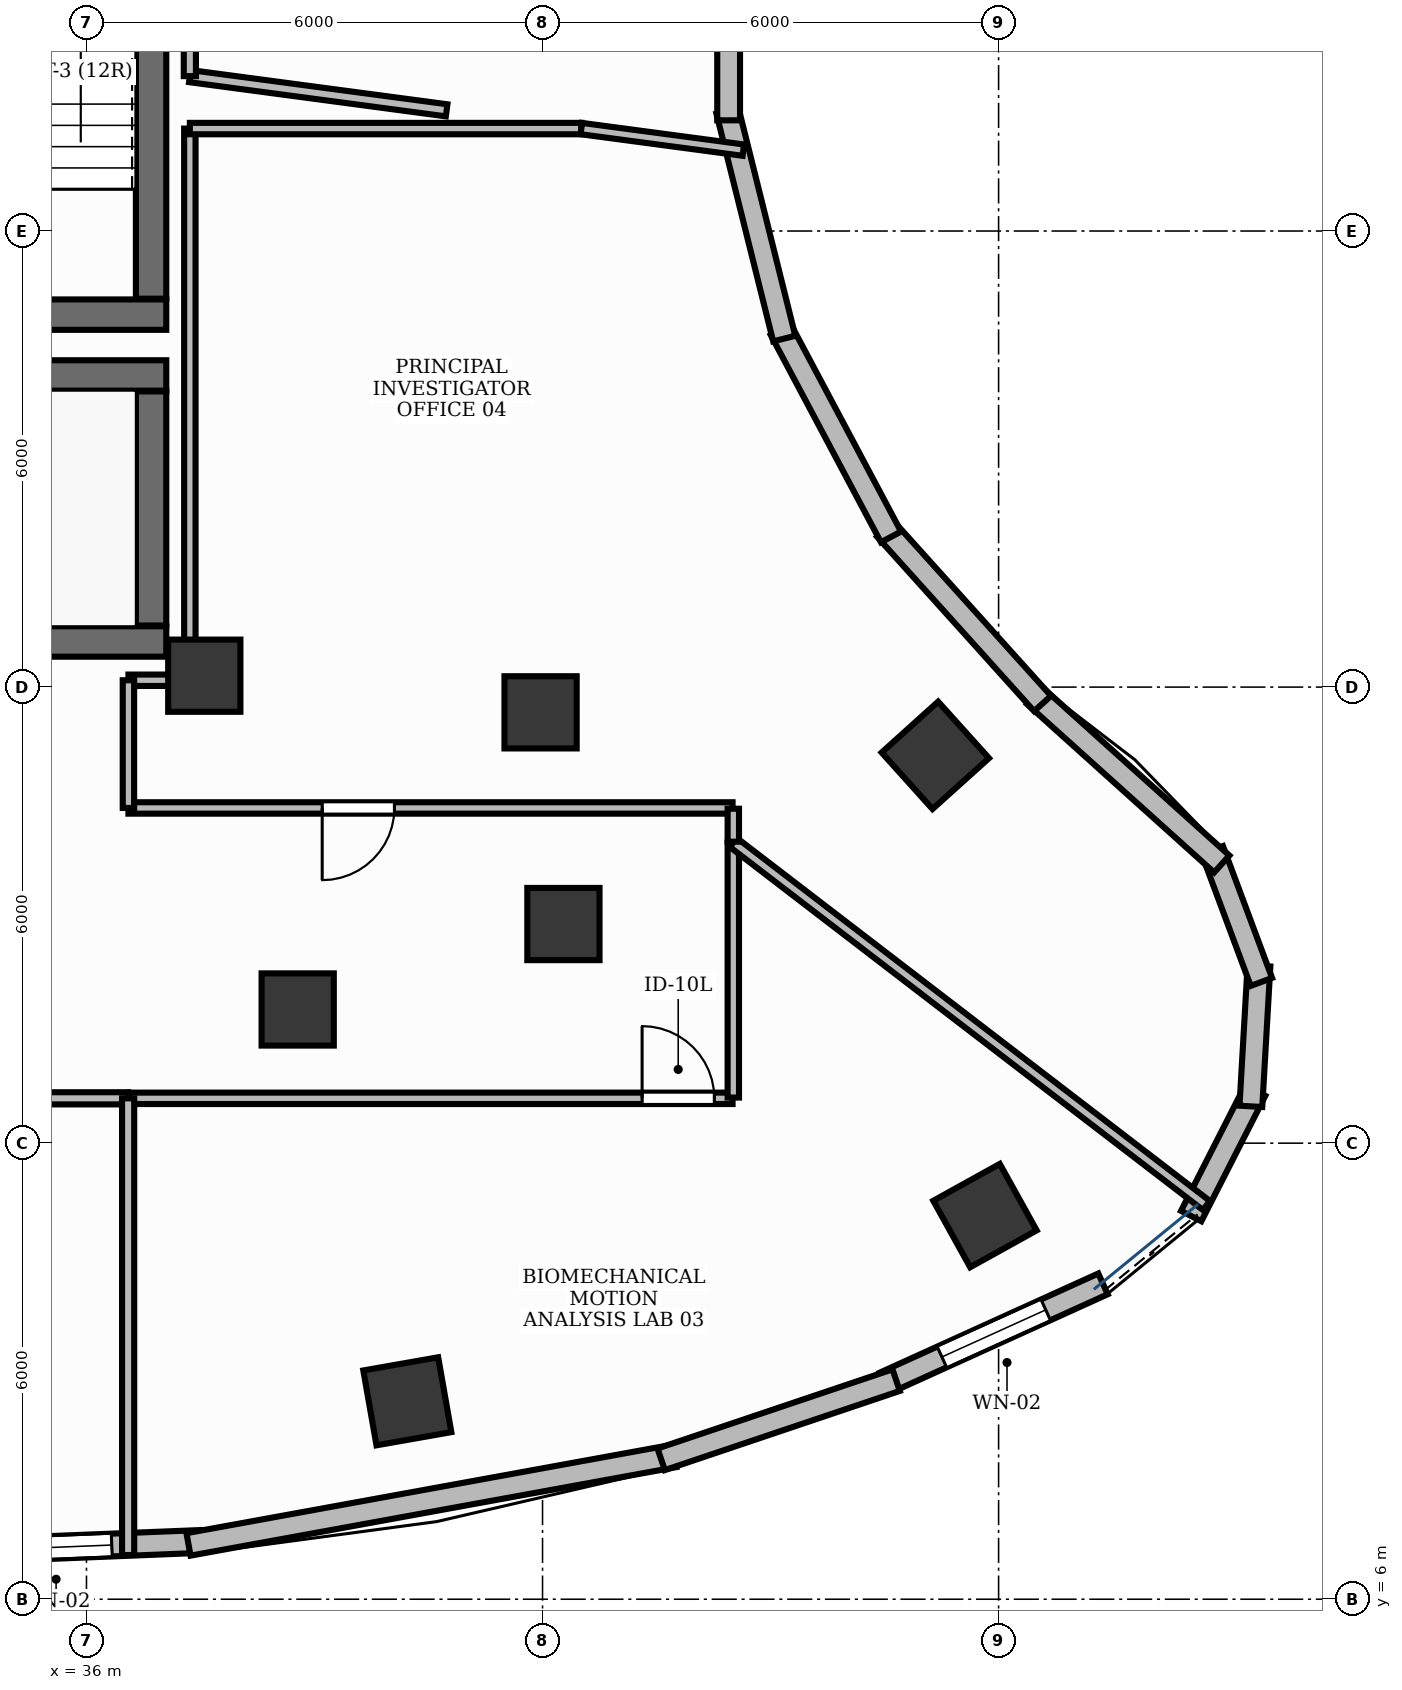
"""IFC4 building model, lengths in metres.
Left out: names, types, materials, properties, quantities, classifications, styles, units other than length and angle.
Written with IfcOpenShell. Run it as: python <this file> out.ifc"""

import sys

from ifc_helpers import new_model, si_unit, direction, frame, frame_2d, origin, origin_2d, place, context, subcontext, project, spatial, rectangle, extrude, element, fill, save


model = new_model("IFC4")
c1 = context("Model", 3, precision=1e-05, world=origin(), true_north=direction((0.0, 1.0)))
c2 = subcontext(c1, "Body", "Model", "MODEL_VIEW")
j1 = project(units=[si_unit("LENGTHUNIT", "METRE"), si_unit("PLANEANGLEUNIT", "RADIAN")], contexts=[c1])
p1 = place(None, origin())
s1 = spatial("IfcSite", under=j1, at=p1, CompositionType="ELEMENT")
p2 = place(p1, origin())
s2 = spatial("IfcBuilding", under=s1, at=p2, CompositionType="ELEMENT")
p3 = place(p2, frame((0.0, 0.0, 175.2)))
s3 = spatial("IfcBuildingStorey", under=s2, at=p3, CompositionType="ELEMENT", Elevation=175.2)
p4 = place(p3, frame((28.852, 18.6, 0.0), z_axis=(0.0, 0.0, 1.0), x_axis=(1.0, 0.0, 0.0)))
e1 = element("IfcWall", 1, at=p4, inside=s3, PredefinedType="SHEAR", context=c2, shape_type="SweptSolid", body=[
    extrude(rectangle(XDim=8.198, YDim=0.4, at=frame_2d((4.099, 0.0))), origin(), (0.0, 0.0, 1.0), 3.9),
])
p5 = place(p3, frame((28.4, 22.1, 0.0), z_axis=(0.0, 0.0, 1.0), x_axis=(1.0, 0.0, 0.0)))
e2 = element("IfcWall", 2, at=p5, inside=s3, PredefinedType="SHEAR", context=c2, shape_type="SweptSolid", body=[
    extrude(rectangle(XDim=8.65, YDim=0.4, at=frame_2d((4.325, 0.0))), origin(), (0.0, 0.0, 1.0), 3.9),
])
p6 = place(p3, frame((36.85, 18.81, 0.0), z_axis=(0.0, 0.0, 1.0), x_axis=(0.0, 1.0, 0.0)))
e3 = element("IfcWall", 3, at=p6, inside=s3, PredefinedType="SHEAR", context=c2, shape_type="SweptSolid", body=[
    extrude(rectangle(XDim=3.08, YDim=0.4, at=frame_2d((1.54, 0.0))), origin(), (0.0, 0.0, 1.0), 3.9),
])
p7 = place(p3, frame((33.15, 22.9, 0.0), z_axis=(0.0, 0.0, 1.0), x_axis=(1.0, 0.0, 0.0)))
e4 = element("IfcWall", 4, at=p7, inside=s3, PredefinedType="SHEAR", context=c2, shape_type="SweptSolid", body=[
    extrude(rectangle(XDim=3.9, YDim=0.4, at=frame_2d((1.95, 0.0))), origin(), (0.0, 0.0, 1.0), 3.9),
])
p8 = place(p3, frame((36.85, 23.11, 0.0), z_axis=(0.0, 0.0, 1.0), x_axis=(0.0, 1.0, 0.0)))
e5 = element("IfcWall", 5, at=p8, inside=s3, PredefinedType="SHEAR", context=c2, shape_type="SweptSolid", body=[
    extrude(rectangle(XDim=7.78, YDim=0.4, at=frame_2d((3.89, 0.0))), origin(), (0.0, 0.0, 1.0), 3.9),
])
p9 = place(p3, frame((37.55, 18.15, -0.0), z_axis=(0.0, 0.0, 1.0), x_axis=(1.0, 0.0, 0.0)))
e6 = element("IfcColumn", 6, at=p9, inside=s3, PredefinedType="PILASTER", context=c2, shape_type="SweptSolid", body=[
    extrude(rectangle(XDim=0.95, YDim=0.95, at=origin_2d()), origin(), (0.0, 0.0, 1.0), 3.901),
])
p10 = place(p3, frame((40.221, 8.604, -0.0), z_axis=(0.0, 0.0, 1.0), x_axis=(0.984868307662, 0.173304404339, 0.0)))
e7 = element("IfcColumn", 7, at=p10, inside=s3, PredefinedType="COLUMN", context=c2, shape_type="SweptSolid", body=[
    extrude(rectangle(XDim=1.0, YDim=1.0, at=origin_2d()), origin(), (0.0, 0.0, 1.0), 3.901),
])
p11 = place(p3, frame((38.779, 13.759, -0.0), z_axis=(0.0, 0.0, 1.0), x_axis=(1.0, 0.0, 0.0)))
e8 = element("IfcColumn", 8, at=p11, inside=s3, PredefinedType="COLUMN", context=c2, shape_type="SweptSolid", body=[
    extrude(rectangle(XDim=0.95, YDim=0.95, at=origin_2d()), origin(), (0.0, 0.0, 1.0), 3.901),
])
p12 = place(p3, frame((47.821, 11.047, -0.0), z_axis=(0.0, 0.0, 1.0), x_axis=(0.874535078577, 0.484962262797, 0.0)))
e9 = element("IfcColumn", 9, at=p12, inside=s3, PredefinedType="COLUMN", context=c2, shape_type="SweptSolid", body=[
    extrude(rectangle(XDim=1.0, YDim=1.0, at=origin_2d()), origin(), (0.0, 0.0, 1.0), 3.901),
])
p13 = place(p3, frame((42.275, 14.883, -0.0), z_axis=(0.0, 0.0, 1.0), x_axis=(1.0, 0.0, 0.0)))
e10 = element("IfcColumn", 10, at=p13, inside=s3, PredefinedType="COLUMN", context=c2, shape_type="SweptSolid", body=[
    extrude(rectangle(XDim=0.95, YDim=0.95, at=origin_2d()), origin(), (0.0, 0.0, 1.0), 3.901),
])
p14 = place(p3, frame((47.167, 17.102, -0.0), z_axis=(0.0, 0.0, 1.0), x_axis=(-0.669130606359, 0.743144825477, 0.0)))
e11 = element("IfcColumn", 11, at=p14, inside=s3, PredefinedType="COLUMN", context=c2, shape_type="SweptSolid", body=[
    extrude(rectangle(XDim=1.0, YDim=1.0, at=origin_2d()), origin(), (0.0, 0.0, 1.0), 3.901),
])
p15 = place(p3, frame((41.974, 17.668, -0.0), z_axis=(0.0, 0.0, 1.0), x_axis=(1.0, 0.0, 0.0)))
e12 = element("IfcColumn", 12, at=p15, inside=s3, PredefinedType="COLUMN", context=c2, shape_type="SweptSolid", body=[
    extrude(rectangle(XDim=0.95, YDim=0.95, at=origin_2d()), origin(), (0.0, 0.0, 1.0), 3.901),
])
p16 = place(p3, frame((34.174, 6.626, 0.0), z_axis=(0.0, 0.0, 1.0), x_axis=(0.999191674443, 0.040199474165, 0.0)))
e13 = element("IfcWall", 13, at=p16, inside=s3, PredefinedType="STANDARD", context=c2, shape_type="SweptSolid", body=[
    extrude(rectangle(XDim=3.328, YDim=0.3, at=frame_2d((1.664, 0.0))), origin(), (0.0, 0.0, 1.0), 3.9),
])
p17 = place(p16, frame((0.66, 0.0, 0.95)))
e14 = element("IfcOpeningElement", 14, at=p17, cuts=e13, PredefinedType="OPENING", context=c2, shape_type="SweptSolid", body=[
    extrude(rectangle(XDim=1.5, YDim=1.8, at=frame_2d((0.75, 0.9))), frame((0.0, 0.165, 0.0), z_axis=(0.0, -1.0, 0.0), x_axis=(1.0, 0.0, 0.0)), (0.0, 0.0, 1.0), 0.33),
])
p18 = place(p3, frame((46.5, 8.845, 0.0), z_axis=(0.0, 0.0, 1.0), x_axis=(0.910644509231, 0.413190728124, 0.0)))
e15 = element("IfcWall", 15, at=p18, inside=s3, PredefinedType="STANDARD", context=c2, shape_type="SweptSolid", body=[
    extrude(rectangle(XDim=3.155, YDim=0.3, at=frame_2d((1.578, 0.0))), origin(), (0.0, 0.0, 1.0), 3.9),
])
p19 = place(p18, frame((0.828, 0.0, 0.95)))
e16 = element("IfcOpeningElement", 16, at=p19, cuts=e15, PredefinedType="OPENING", context=c2, shape_type="SweptSolid", body=[
    extrude(rectangle(XDim=1.5, YDim=1.8, at=frame_2d((0.75, 0.9))), frame((0.0, 0.165, 0.0), z_axis=(0.0, -1.0, 0.0), x_axis=(1.0, 0.0, 0.0)), (0.0, 0.0, 1.0), 0.33),
])
p20 = place(p3, frame((37.342, 6.721, 0.0), z_axis=(0.0, 0.0, 1.0), x_axis=(0.983808533342, 0.179222681945, 0.0)))
e17 = element("IfcWall", 17, at=p20, inside=s3, PredefinedType="STANDARD", context=c2, shape_type="SweptSolid", body=[
    extrude(rectangle(XDim=6.498, YDim=0.3, at=frame_2d((3.249, 0.0))), origin(), (0.0, 0.0, 1.0), 3.9),
])
p21 = place(p3, frame((43.561, 7.841, 0.0), z_axis=(0.0, 0.0, 1.0), x_axis=(0.947683163779, 0.319212501462, 0.0)))
e18 = element("IfcWall", 18, at=p21, inside=s3, PredefinedType="STANDARD", context=c2, shape_type="SweptSolid", body=[
    extrude(rectangle(XDim=3.262, YDim=0.3, at=frame_2d((1.631, 0.0))), origin(), (0.0, 0.0, 1.0), 3.9),
])
for number, where, z_axis, x_axis in (
    (19, (50.534, 11.041, 0.0), (0.0, 0.0, 1.0), (0.454, 0.891, 0.0)),
    (20, (51.319, 12.484, 0.0), (0.0, 0.0, 1.0), (0.057, 0.998, 0.0)),
    (21, (51.458, 14.121, 0.0), (0.0, 0.0, 1.0), (-0.349, 0.937, 0.0)),
):
    element("IfcWall", number, at=place(p3, frame(where, z_axis=z_axis, x_axis=x_axis)), inside=s3, PredefinedType="STANDARD", context=c2, shape_type="SweptSolid", body=[
        extrude(rectangle(XDim=1.852, YDim=0.3, at=frame_2d((0.926, 0.0))), origin(), (0.0, 0.0, 1.0), 3.9),
    ])
p22 = place(p3, frame((50.936, 15.673, 0.0), z_axis=(0.0, 0.0, 1.0), x_axis=(-0.743341827472, 0.668911748687, 0.0)))
e22 = element("IfcWall", 22, at=p22, inside=s3, PredefinedType="STANDARD", context=c2, shape_type="SweptSolid", body=[
    extrude(rectangle(XDim=3.31, YDim=0.3, at=frame_2d((1.655, 0.0))), origin(), (0.0, 0.0, 1.0), 3.9),
])
for number, where, z_axis, x_axis in (
    (23, (48.579, 17.784, 0.0), (0.0, 0.0, 1.0), (-0.669, 0.743, 0.0)),
    (24, (46.584, 19.976, 0.0), (0.0, 0.0, 1.0), (-0.469, 0.883, 0.0)),
    (25, (45.18, 22.585, 0.0), (0.0, 0.0, 1.0), (-0.242, 0.97, 0.0)),
    (26, (44.448, 25.457, 0.0), (0.0, 0.0, 1.0), (0.0, 1.0, 0.0)),
):
    element("IfcWall", number, at=place(p3, frame(where, z_axis=z_axis, x_axis=x_axis)), inside=s3, PredefinedType="STANDARD", context=c2, shape_type="SweptSolid", body=[
        extrude(rectangle(XDim=3.087, YDim=0.3, at=frame_2d((1.543, 0.0))), origin(), (0.0, 0.0, 1.0), 3.9),
    ])
p23 = place(p3, frame((19.85, 12.59, 0.0), z_axis=(0.0, 0.0, 1.0), x_axis=(1.0, 0.0, 0.0)))
e27 = element("IfcWall", 27, at=p23, inside=s3, PredefinedType="PARTITIONING", context=c2, shape_type="SweptSolid", body=[
    extrude(rectangle(XDim=16.698, YDim=0.16, at=frame_2d((8.349, 0.0))), origin(), (0.0, 0.0, 1.0), 2.91),
])
p24 = place(p23, frame((4.999, 0.0, 0.0)))
e28 = element("IfcOpeningElement", 28, at=p24, cuts=e27, PredefinedType="OPENING", context=c2, shape_type="SweptSolid", body=[
    extrude(rectangle(XDim=0.95, YDim=2.15, at=frame_2d((0.475, 1.075))), frame((0.0, 0.095, 0.0), z_axis=(0.0, -1.0, 0.0), x_axis=(1.0, 0.0, 0.0)), (0.0, 0.0, 1.0), 0.19),
])
p25 = place(p3, frame((36.558, 12.59, 0.0), z_axis=(0.0, 0.0, 1.0), x_axis=(1.0, 0.0, 0.0)))
e29 = element("IfcWall", 29, at=p25, inside=s3, PredefinedType="PARTITIONING", context=c2, shape_type="SweptSolid", body=[
    extrude(rectangle(XDim=7.942, YDim=0.15, at=frame_2d((3.971, 0.0))), origin(), (0.0, 0.0, 1.0), 2.91),
])
p26 = place(p25, frame((6.752, 0.0, 0.0)))
e30 = element("IfcOpeningElement", 30, at=p26, cuts=e29, PredefinedType="OPENING", context=c2, shape_type="SweptSolid", body=[
    extrude(rectangle(XDim=0.95, YDim=2.15, at=frame_2d((0.475, 1.075))), frame((0.0, 0.09, 0.0), z_axis=(0.0, -1.0, 0.0), x_axis=(1.0, 0.0, 0.0)), (0.0, 0.0, 1.0), 0.18),
])
p27 = place(p3, frame((44.5, 16.41, 0.0), z_axis=(0.0, 0.0, 1.0), x_axis=(-1.0, 0.0, 0.0)))
e31 = element("IfcWall", 31, at=p27, inside=s3, PredefinedType="PARTITIONING", context=c2, shape_type="SweptSolid", body=[
    extrude(rectangle(XDim=7.948, YDim=0.15, at=frame_2d((3.974, 0.0))), origin(), (0.0, 0.0, 1.0), 2.91),
])
p28 = place(p27, frame((4.449, 0.0, 0.0)))
e32 = element("IfcOpeningElement", 32, at=p28, cuts=e31, PredefinedType="OPENING", context=c2, shape_type="SweptSolid", body=[
    extrude(rectangle(XDim=0.95, YDim=2.15, at=frame_2d((0.475, 1.075))), frame((0.0, 0.09, 0.0), z_axis=(0.0, -1.0, 0.0), x_axis=(1.0, 0.0, 0.0)), (0.0, 0.0, 1.0), 0.18),
])
p29 = place(p3, frame((36.548, 12.59, 0.0), z_axis=(0.0, 0.0, 1.0), x_axis=(0.0, -1.0, 0.0)))
e33 = element("IfcWall", 33, at=p29, inside=s3, PredefinedType="PARTITIONING", context=c2, shape_type="SweptSolid", body=[
    extrude(rectangle(XDim=6.008, YDim=0.16, at=frame_2d((3.004, 0.0))), origin(), (0.0, 0.0, 1.0), 2.91),
])
p30 = place(p3, frame((44.51, 12.6, 0.0), z_axis=(0.0, 0.0, 1.0), x_axis=(0.0, 1.0, 0.0)))
e34 = element("IfcWall", 34, at=p30, inside=s3, PredefinedType="PARTITIONING", context=c2, shape_type="SweptSolid", body=[
    extrude(rectangle(XDim=3.356, YDim=0.15, at=frame_2d((1.678, 0.0))), origin(), (0.0, 0.0, 1.0), 2.91),
])
p31 = place(p3, frame((44.51, 15.956, 0.0), z_axis=(0.0, 0.0, 1.0), x_axis=(0.793353363714, -0.608761398484, 0.0)))
e35 = element("IfcWall", 35, at=p31, inside=s3, PredefinedType="PARTITIONING", context=c2, shape_type="SweptSolid", body=[
    extrude(rectangle(XDim=7.846, YDim=0.15, at=frame_2d((3.923, 0.0))), origin(), (0.0, 0.0, 1.0), 2.91),
])
p32 = place(p3, frame((36.552, 18.09, 0.0), z_axis=(0.0, 0.0, 1.0), x_axis=(1.0, 0.0, 0.0)))
e36 = element("IfcWall", 36, at=p32, inside=s3, PredefinedType="PARTITIONING", context=c2, shape_type="SweptSolid", body=[
    extrude(rectangle(XDim=0.798, YDim=0.15, at=frame_2d((0.399, 0.0))), origin(), (0.0, 0.0, 1.0), 2.91),
])
p33 = place(p3, frame((37.36, 18.1, 0.0), z_axis=(0.0, 0.0, 1.0), x_axis=(0.0, 1.0, 0.0)))
e37 = element("IfcWall", 37, at=p33, inside=s3, PredefinedType="PARTITIONING", context=c2, shape_type="SweptSolid", body=[
    extrude(rectangle(XDim=7.248, YDim=0.15, at=frame_2d((3.624, 0.0))), origin(), (0.0, 0.0, 1.0), 2.91),
])
p34 = place(p3, frame((37.36, 25.348, 0.0), z_axis=(0.0, 0.0, 1.0), x_axis=(1.0, 0.0, 0.0)))
e38 = element("IfcWall", 38, at=p34, inside=s3, PredefinedType="PARTITIONING", context=c2, shape_type="SweptSolid", body=[
    extrude(rectangle(XDim=5.15, YDim=0.15, at=frame_2d((2.575, 0.0))), origin(), (0.0, 0.0, 1.0), 2.91),
])
p35 = place(p3, frame((42.51, 25.348, 0.0), z_axis=(0.0, 0.0, 1.0), x_axis=(0.991248706097, -0.132007585617, 0.0)))
e39 = element("IfcWall", 39, at=p35, inside=s3, PredefinedType="PARTITIONING", context=c2, shape_type="SweptSolid", body=[
    extrude(rectangle(XDim=2.151, YDim=0.15, at=frame_2d((1.075, 0.0))), origin(), (0.0, 0.0, 1.0), 2.91),
])
p36 = place(p3, frame((44.51, 15.966, 0.0), z_axis=(0.0, 0.0, 1.0), x_axis=(0.0, 1.0, 0.0)))
e40 = element("IfcWall", 40, at=p36, inside=s3, PredefinedType="PARTITIONING", context=c2, shape_type="SweptSolid", body=[
    extrude(rectangle(XDim=0.434, YDim=0.15, at=frame_2d((0.217, 0.0))), origin(), (0.0, 0.0, 1.0), 2.91),
])
p37 = place(p3, frame((36.552, 16.41, 0.0), z_axis=(0.0, 0.0, 1.0), x_axis=(0.0, 1.0, 0.0)))
e41 = element("IfcWall", 41, at=p37, inside=s3, PredefinedType="PARTITIONING", context=c2, shape_type="SweptSolid", body=[
    extrude(rectangle(XDim=1.68, YDim=0.15, at=frame_2d((0.84, 0.0))), origin(), (0.0, 0.0, 1.0), 2.91),
])
p38 = place(p3, frame((40.738, 25.588, 0.0), z_axis=(0.0, 0.0, 1.0), x_axis=(-0.9912460353, 0.13202763916, 0.0)))
e42 = element("IfcWall", 42, at=p38, inside=s3, PredefinedType="PARTITIONING", context=c2, shape_type="SweptSolid", body=[
    extrude(rectangle(XDim=3.408, YDim=0.16, at=frame_2d((1.704, 0.0))), origin(), (0.0, 0.0, 1.0), 2.91),
])
p39 = place(p3, frame((37.36, 26.038, 0.0), z_axis=(0.0, 0.0, 1.0), x_axis=(0.0, 1.0, 0.0)))
e43 = element("IfcWall", 43, at=p39, inside=s3, PredefinedType="PARTITIONING", context=c2, shape_type="SweptSolid", body=[
    extrude(rectangle(XDim=7.912, YDim=0.16, at=frame_2d((3.956, 0.0))), origin(), (0.0, 0.0, 1.0), 2.91),
])
p40 = place(p17, origin())
e44 = element("IfcWindow", 44, at=p40, inside=s3, PartitioningType="DOUBLE_PANEL_VERTICAL", PredefinedType="WINDOW", context=c2, shape_type="SweptSolid", body=[
    extrude(rectangle(XDim=1.5, YDim=1.8, at=frame_2d((0.75, 0.9))), frame((0.0, 0.03, 0.0), z_axis=(0.0, -1.0, 0.0), x_axis=(1.0, 0.0, 0.0)), (0.0, 0.0, 1.0), 0.06),
])
fill(e14, e44)
p41 = place(p19, origin())
e45 = element("IfcWindow", 45, at=p41, inside=s3, PartitioningType="DOUBLE_PANEL_VERTICAL", PredefinedType="WINDOW", context=c2, shape_type="SweptSolid", body=[
    extrude(rectangle(XDim=1.5, YDim=1.8, at=frame_2d((0.75, 0.9))), frame((0.0, 0.03, 0.0), z_axis=(0.0, -1.0, 0.0), x_axis=(1.0, 0.0, 0.0)), (0.0, 0.0, 1.0), 0.06),
])
fill(e16, e45)
p42 = place(p26, origin())
e46 = element("IfcDoor", 46, at=p42, inside=s3, OperationType="SINGLE_SWING_LEFT", PredefinedType="DOOR", context=c2, shape_type="SweptSolid", body=[
    extrude(rectangle(XDim=0.95, YDim=2.15, at=frame_2d((0.475, 1.075))), frame((0.0, 0.025, 0.0), z_axis=(0.0, -1.0, 0.0), x_axis=(1.0, 0.0, 0.0)), (0.0, 0.0, 1.0), 0.05),
])
fill(e30, e46)
p43 = place(p28, origin())
e47 = element("IfcDoor", 47, at=p43, inside=s3, OperationType="SINGLE_SWING_RIGHT", PredefinedType="DOOR", context=c2, shape_type="SweptSolid", body=[
    extrude(rectangle(XDim=0.95, YDim=2.15, at=frame_2d((0.475, 1.075))), frame((0.0, 0.025, 0.0), z_axis=(0.0, -1.0, 0.0), x_axis=(1.0, 0.0, 0.0)), (0.0, 0.0, 1.0), 0.05),
])
fill(e32, e47)
save(model, sys.argv[1])
